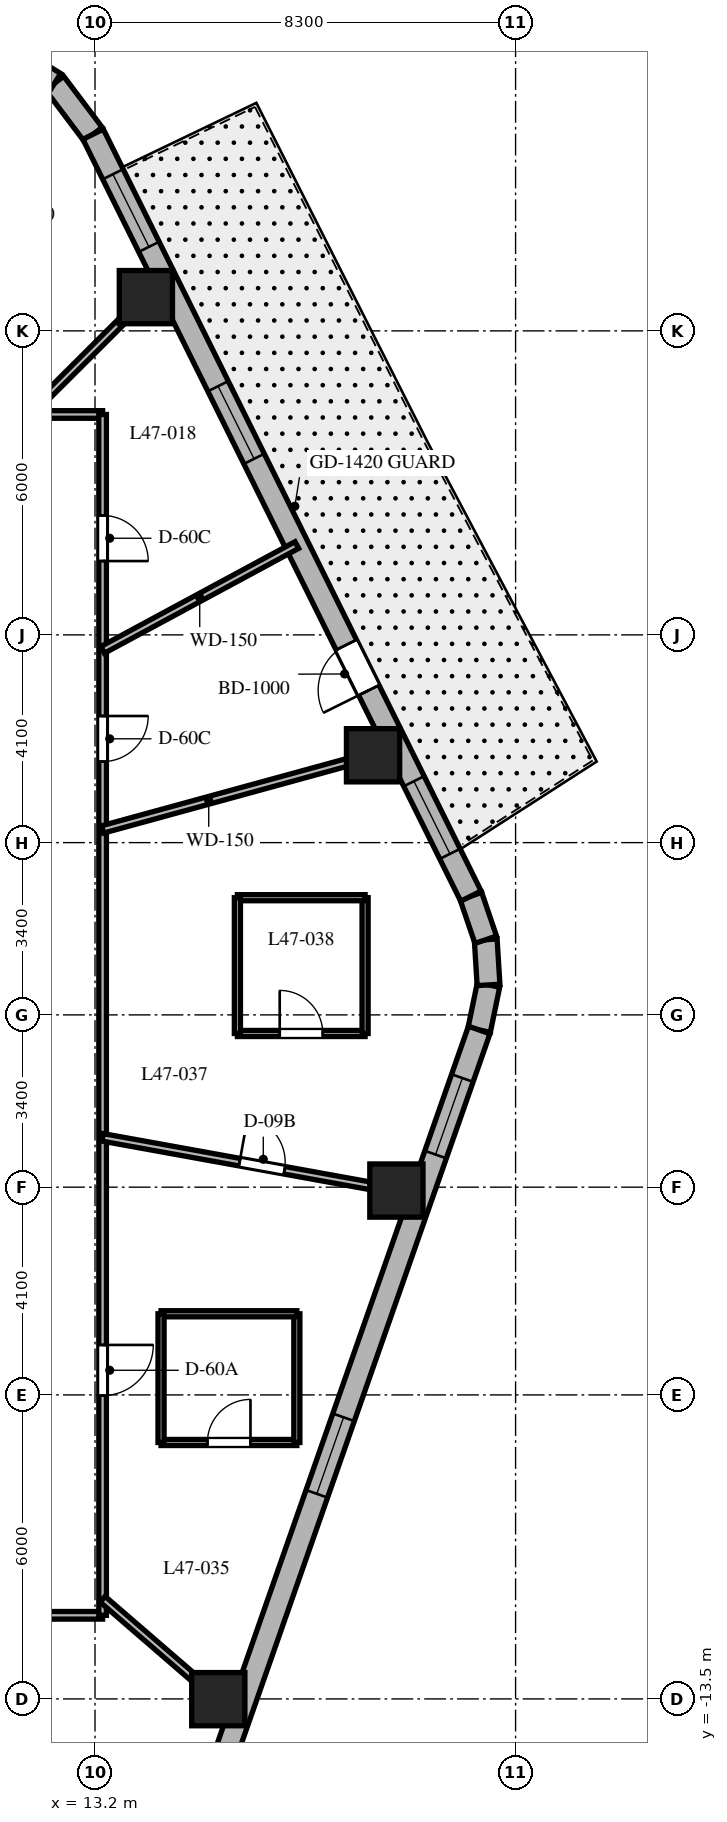
"""IFC4 building model, lengths in metres.
Left out: names, types, materials, properties, quantities, classifications, styles, units other than length and angle.
Written with IfcOpenShell. Run it as: python <this file> out.ifc"""

import sys

from ifc_helpers import new_model, si_unit, direction, frame, frame_2d, origin, origin_2d, place, context, subcontext, project, spatial, rectangle, extrude, element, fill, save


model = new_model("IFC4")
c1 = context("Model", 3, precision=1e-05, world=origin(), true_north=direction((0.0, 1.0)))
c2 = subcontext(c1, "Body", "Model", "MODEL_VIEW")
j1 = project(units=[si_unit("LENGTHUNIT", "METRE"), si_unit("PLANEANGLEUNIT", "RADIAN")], contexts=[c1])
p1 = place(None, origin())
s1 = spatial("IfcSite", under=j1, at=p1, CompositionType="ELEMENT")
p2 = place(p1, origin())
s2 = spatial("IfcBuilding", under=s1, at=p2, CompositionType="ELEMENT")
p3 = place(p2, frame((0.0, 0.0, 190.4)))
s3 = spatial("IfcBuildingStorey", under=s2, at=p3, CompositionType="ELEMENT", Elevation=190.4)
for number, where, z_axis, x_axis in (
    (1, (15.633, -13.505, 0.0), (0.0, 0.0, 1.0), (1.0, 0.0, 0.0)),
    (2, (19.148, -3.467, 0.0), (0.0, 0.0, 1.0), (1.0, 0.0, 0.0)),
    (3, (18.687, 5.124, 0.0), (0.0, 0.0, 1.0), (1.0, 0.0, 0.0)),
    (4, (14.204, 14.166, 0.0), (0.0, 0.0, 1.0), (1.0, 0.0, 0.0)),
):
    element("IfcColumn", number, at=place(p3, frame(where, z_axis=z_axis, x_axis=x_axis)), inside=s3, PredefinedType="COLUMN", context=c2, shape_type="SweptSolid", body=[
        extrude(rectangle(XDim=1.05, YDim=1.05, at=origin_2d()), origin(), (0.0, 0.0, 1.0), 3.7),
    ])
p4 = place(p3, frame((20.782, -0.298, 0.0), z_axis=(0.0, 0.0, 1.0), x_axis=(0.202570068411, 0.979267771033, 0.0)))
e5 = element("IfcWall", 5, at=p4, inside=s3, PredefinedType="SOLIDWALL", context=c2, shape_type="SweptSolid", body=[
    extrude(rectangle(XDim=0.909, YDim=0.45, at=frame_2d((0.454, 0.0))), origin(), (0.0, 0.0, 1.0), 3.4),
])
p5 = place(p3, frame((20.966, 0.592, 0.0), z_axis=(0.0, 0.0, 1.0), x_axis=(-0.061748898935, 0.998091715966, 0.0)))
e6 = element("IfcWall", 6, at=p5, inside=s3, PredefinedType="SOLIDWALL", context=c2, shape_type="SweptSolid", body=[
    extrude(rectangle(XDim=0.894, YDim=0.45, at=frame_2d((0.447, 0.0))), origin(), (0.0, 0.0, 1.0), 3.4),
])
p6 = place(p3, frame((20.911, 1.484, 0.0), z_axis=(0.0, 0.0, 1.0), x_axis=(-0.321623334353, 0.946867694453, 0.0)))
e7 = element("IfcWall", 7, at=p6, inside=s3, PredefinedType="SOLIDWALL", context=c2, shape_type="SweptSolid", body=[
    extrude(rectangle(XDim=0.909, YDim=0.45, at=frame_2d((0.454, 0.0))), origin(), (0.0, 0.0, 1.0), 3.4),
])
p7 = place(p3, frame((13.162, 17.381, 0.0), z_axis=(0.0, 0.0, 1.0), x_axis=(-0.601515770517, 0.798860925205, 0.0)))
e8 = element("IfcWall", 8, at=p7, inside=s3, PredefinedType="SOLIDWALL", context=c2, shape_type="SweptSolid", body=[
    extrude(rectangle(XDim=1.262, YDim=0.45, at=frame_2d((0.631, 0.0))), origin(), (0.0, 0.0, 1.0), 3.4),
])
p8 = place(p3, frame((12.403, 18.389, 0.0), z_axis=(0.0, 0.0, 1.0), x_axis=(-0.849795170926, 0.527113049991, 0.0)))
e9 = element("IfcWall", 9, at=p8, inside=s3, PredefinedType="SOLIDWALL", context=c2, shape_type="SweptSolid", body=[
    extrude(rectangle(XDim=1.241, YDim=0.45, at=frame_2d((0.62, 0.0))), origin(), (0.0, 0.0, 1.0), 3.4),
])
p9 = place(p3, frame((14.937, -16.993, 0.0), z_axis=(0.0, 0.0, 1.0), x_axis=(0.330431575061, 0.943829949834, 0.0)))
e10 = element("IfcWall", 10, at=p9, inside=s3, PredefinedType="SOLIDWALL", context=c2, shape_type="SweptSolid", body=[
    extrude(rectangle(XDim=17.689, YDim=0.45, at=frame_2d((8.844, 0.0))), origin(), (0.0, 0.0, 1.0), 3.4),
])
p10 = place(p9, frame((0.95, 0.0, 0.8)))
e11 = element("IfcOpeningElement", 11, at=p10, cuts=e10, PredefinedType="OPENING", context=c2, shape_type="SweptSolid", body=[
    extrude(rectangle(XDim=1.6, YDim=1.75, at=frame_2d((0.8, 0.875))), frame((0.0, 0.235, 0.0), z_axis=(0.0, -1.0, 0.0), x_axis=(1.0, 0.0, 0.0)), (0.0, 0.0, 1.0), 0.47),
])
p11 = place(p9, frame((7.99, 0.0, 0.8)))
e12 = element("IfcOpeningElement", 12, at=p11, cuts=e10, PredefinedType="OPENING", context=c2, shape_type="SweptSolid", body=[
    extrude(rectangle(XDim=1.6, YDim=1.75, at=frame_2d((0.8, 0.875))), frame((0.0, 0.235, 0.0), z_axis=(0.0, -1.0, 0.0), x_axis=(1.0, 0.0, 0.0)), (0.0, 0.0, 1.0), 0.47),
])
p12 = place(p9, frame((15.084, 0.0, 0.8)))
e13 = element("IfcOpeningElement", 13, at=p12, cuts=e10, PredefinedType="OPENING", context=c2, shape_type="SweptSolid", body=[
    extrude(rectangle(XDim=1.6, YDim=1.75, at=frame_2d((0.8, 0.875))), frame((0.0, 0.235, 0.0), z_axis=(0.0, -1.0, 0.0), x_axis=(1.0, 0.0, 0.0)), (0.0, 0.0, 1.0), 0.47),
])
p13 = place(p3, frame((20.618, 2.344, 0.0), z_axis=(0.0, 0.0, 1.0), x_axis=(-0.444243691097, 0.895905990002, 0.0)))
e14 = element("IfcWall", 14, at=p13, inside=s3, PredefinedType="SOLIDWALL", context=c2, shape_type="SweptSolid", body=[
    extrude(rectangle(XDim=16.784, YDim=0.45, at=frame_2d((8.392, 0.0))), origin(), (0.0, 0.0, 1.0), 3.4),
])
p14 = place(p13, frame((4.535, 0.0, 0.0)))
e15 = element("IfcOpeningElement", 15, at=p14, cuts=e14, PredefinedType="OPENING", context=c2, shape_type="SweptSolid", body=[
    extrude(rectangle(XDim=1.0, YDim=2.15, at=frame_2d((0.5, 1.075))), frame((0.0, 0.235, 0.0), z_axis=(0.0, -1.0, 0.0), x_axis=(1.0, 0.0, 0.0)), (0.0, 0.0, 1.0), 0.47),
])
p15 = place(p13, frame((9.633, 0.0, 0.8)))
e16 = element("IfcOpeningElement", 16, at=p15, cuts=e14, PredefinedType="OPENING", context=c2, shape_type="SweptSolid", body=[
    extrude(rectangle(XDim=1.6, YDim=1.75, at=frame_2d((0.8, 0.875))), frame((0.0, 0.235, 0.0), z_axis=(0.0, -1.0, 0.0), x_axis=(1.0, 0.0, 0.0)), (0.0, 0.0, 1.0), 0.47),
])
p16 = place(p13, frame((14.303, 0.0, 0.8)))
e17 = element("IfcOpeningElement", 17, at=p16, cuts=e14, PredefinedType="OPENING", context=c2, shape_type="SweptSolid", body=[
    extrude(rectangle(XDim=1.6, YDim=1.75, at=frame_2d((0.8, 0.875))), frame((0.0, 0.235, 0.0), z_axis=(0.0, -1.0, 0.0), x_axis=(1.0, 0.0, 0.0)), (0.0, 0.0, 1.0), 0.47),
])
p17 = place(p13, frame((0.931, 0.0, 0.8)))
e18 = element("IfcOpeningElement", 18, at=p17, cuts=e14, PredefinedType="OPENING", context=c2, shape_type="SweptSolid", body=[
    extrude(rectangle(XDim=1.6, YDim=1.75, at=frame_2d((0.8, 0.875))), frame((0.0, 0.235, 0.0), z_axis=(0.0, -1.0, 0.0), x_axis=(1.0, 0.0, 0.0)), (0.0, 0.0, 1.0), 0.47),
])
p18 = place(p3, frame((13.35, -11.85, 0.0), z_axis=(0.0, 0.0, 1.0), x_axis=(-1.0, 0.0, 0.0)))
e19 = element("IfcWall", 19, at=p18, inside=s3, PredefinedType="PARTITIONING", context=c2, shape_type="SweptSolid", body=[
    extrude(rectangle(XDim=26.7, YDim=0.15, at=frame_2d((13.35, 0.0))), origin(), (0.0, 0.0, 1.0), 2.84),
])
p19 = place(p18, frame((22.459, 0.0, 0.0)))
e20 = element("IfcOpeningElement", 20, at=p19, cuts=e19, PredefinedType="OPENING", context=c2, shape_type="SweptSolid", body=[
    extrude(rectangle(XDim=0.9, YDim=2.03, at=frame_2d((0.45, 1.015))), frame((0.0, 0.085, 0.0), z_axis=(0.0, -1.0, 0.0), x_axis=(1.0, 0.0, 0.0)), (0.0, 0.0, 1.0), 0.17),
])
p20 = place(p18, frame((18.304, 0.0, 0.0)))
e21 = element("IfcOpeningElement", 21, at=p20, cuts=e19, PredefinedType="OPENING", context=c2, shape_type="SweptSolid", body=[
    extrude(rectangle(XDim=0.9, YDim=2.03, at=frame_2d((0.45, 1.015))), frame((0.0, 0.085, 0.0), z_axis=(0.0, -1.0, 0.0), x_axis=(1.0, 0.0, 0.0)), (0.0, 0.0, 1.0), 0.17),
])
p21 = place(p18, frame((12.362, 0.0, 0.0)))
e22 = element("IfcOpeningElement", 22, at=p21, cuts=e19, PredefinedType="OPENING", context=c2, shape_type="SweptSolid", body=[
    extrude(rectangle(XDim=0.95, YDim=2.03, at=frame_2d((0.475, 1.015))), frame((0.0, 0.085, 0.0), z_axis=(0.0, -1.0, 0.0), x_axis=(1.0, 0.0, 0.0)), (0.0, 0.0, 1.0), 0.17),
])
p22 = place(p18, frame((3.995, 0.0, 0.0)))
e23 = element("IfcOpeningElement", 23, at=p22, cuts=e19, PredefinedType="OPENING", context=c2, shape_type="SweptSolid", body=[
    extrude(rectangle(XDim=0.95, YDim=2.03, at=frame_2d((0.475, 1.015))), frame((0.0, 0.085, 0.0), z_axis=(0.0, -1.0, 0.0), x_axis=(1.0, 0.0, 0.0)), (0.0, 0.0, 1.0), 0.17),
])
p23 = place(p3, frame((-13.35, 11.85, 0.0), z_axis=(0.0, 0.0, 1.0), x_axis=(1.0, 0.0, 0.0)))
e24 = element("IfcWall", 24, at=p23, inside=s3, PredefinedType="PARTITIONING", context=c2, shape_type="SweptSolid", body=[
    extrude(rectangle(XDim=26.7, YDim=0.15, at=frame_2d((13.35, 0.0))), origin(), (0.0, 0.0, 1.0), 2.84),
])
p24 = place(p23, frame((20.682, 0.0, 0.0)))
e25 = element("IfcOpeningElement", 25, at=p24, cuts=e24, PredefinedType="OPENING", context=c2, shape_type="SweptSolid", body=[
    extrude(rectangle(XDim=0.95, YDim=2.03, at=frame_2d((0.475, 1.015))), frame((0.0, 0.085, 0.0), z_axis=(0.0, -1.0, 0.0), x_axis=(1.0, 0.0, 0.0)), (0.0, 0.0, 1.0), 0.17),
])
p25 = place(p23, frame((12.362, 0.0, 0.0)))
e26 = element("IfcOpeningElement", 26, at=p25, cuts=e24, PredefinedType="OPENING", context=c2, shape_type="SweptSolid", body=[
    extrude(rectangle(XDim=0.95, YDim=2.03, at=frame_2d((0.475, 1.015))), frame((0.0, 0.085, 0.0), z_axis=(0.0, -1.0, 0.0), x_axis=(1.0, 0.0, 0.0)), (0.0, 0.0, 1.0), 0.17),
])
p26 = place(p23, frame((3.995, 0.0, 0.0)))
e27 = element("IfcOpeningElement", 27, at=p26, cuts=e24, PredefinedType="OPENING", context=c2, shape_type="SweptSolid", body=[
    extrude(rectangle(XDim=0.95, YDim=2.03, at=frame_2d((0.475, 1.015))), frame((0.0, 0.085, 0.0), z_axis=(0.0, -1.0, 0.0), x_axis=(1.0, 0.0, 0.0)), (0.0, 0.0, 1.0), 0.17),
])
p27 = place(p3, frame((13.35, 11.85, 0.0), z_axis=(0.0, 0.0, 1.0), x_axis=(0.0, -1.0, 0.0)))
e28 = element("IfcWall", 28, at=p27, inside=s3, PredefinedType="PARTITIONING", context=c2, shape_type="SweptSolid", body=[
    extrude(rectangle(XDim=23.7, YDim=0.15, at=frame_2d((11.85, 0.0))), origin(), (0.0, 0.0, 1.0), 2.84),
])
p28 = place(p27, frame((5.951, 0.0, 0.0)))
e29 = element("IfcOpeningElement", 29, at=p28, cuts=e28, PredefinedType="OPENING", context=c2, shape_type="SweptSolid", body=[
    extrude(rectangle(XDim=0.9, YDim=2.03, at=frame_2d((0.45, 1.015))), frame((0.0, 0.085, 0.0), z_axis=(0.0, -1.0, 0.0), x_axis=(1.0, 0.0, 0.0)), (0.0, 0.0, 1.0), 0.17),
])
p29 = place(p27, frame((1.993, 0.0, 0.0)))
e30 = element("IfcOpeningElement", 30, at=p29, cuts=e28, PredefinedType="OPENING", context=c2, shape_type="SweptSolid", body=[
    extrude(rectangle(XDim=0.9, YDim=2.03, at=frame_2d((0.45, 1.015))), frame((0.0, 0.085, 0.0), z_axis=(0.0, -1.0, 0.0), x_axis=(1.0, 0.0, 0.0)), (0.0, 0.0, 1.0), 0.17),
])
p30 = place(p27, frame((18.364, 0.0, 0.0)))
e31 = element("IfcOpeningElement", 31, at=p30, cuts=e28, PredefinedType="OPENING", context=c2, shape_type="SweptSolid", body=[
    extrude(rectangle(XDim=1.0, YDim=2.03, at=frame_2d((0.5, 1.015))), frame((0.0, 0.085, 0.0), z_axis=(0.0, -1.0, 0.0), x_axis=(1.0, 0.0, 0.0)), (0.0, 0.0, 1.0), 0.17),
])
p31 = place(p3, frame((13.35, 3.661, 0.0), z_axis=(0.0, 0.0, 1.0), x_axis=(0.964397145454, 0.264458211898, 0.0)))
e32 = element("IfcWall", 32, at=p31, inside=s3, PredefinedType="PARTITIONING", context=c2, shape_type="SweptSolid", body=[
    extrude(rectangle(XDim=6.039, YDim=0.15, at=frame_2d((3.019, 0.0))), origin(), (0.0, 0.0, 1.0), 2.64),
])
p32 = place(p3, frame((13.35, 7.204, 0.0), z_axis=(0.0, 0.0, 1.0), x_axis=(0.880033329067, 0.474911928394, 0.0)))
e33 = element("IfcWall", 33, at=p32, inside=s3, PredefinedType="PARTITIONING", context=c2, shape_type="SweptSolid", body=[
    extrude(rectangle(XDim=4.355, YDim=0.15, at=frame_2d((2.178, 0.0))), origin(), (0.0, 0.0, 1.0), 2.64),
])
p33 = place(p3, frame((11.882, 11.85, 0.0), z_axis=(0.0, 0.0, 1.0), x_axis=(0.708037373639, 0.706174962407, 0.0)))
e34 = element("IfcWall", 34, at=p33, inside=s3, PredefinedType="PARTITIONING", context=c2, shape_type="SweptSolid", body=[
    extrude(rectangle(XDim=3.802, YDim=0.15, at=frame_2d((1.901, 0.0))), origin(), (0.0, 0.0, 1.0), 2.64),
])
p34 = place(p3, frame((13.35, -11.533, 0.0), z_axis=(0.0, 0.0, 1.0), x_axis=(0.756711647314, -0.65374879183, 0.0)))
e35 = element("IfcWall", 35, at=p34, inside=s3, PredefinedType="PARTITIONING", context=c2, shape_type="SweptSolid", body=[
    extrude(rectangle(XDim=3.55, YDim=0.15, at=frame_2d((1.775, 0.0))), origin(), (0.0, 0.0, 1.0), 2.64),
])
p35 = place(p3, frame((13.35, -2.417, 0.0), z_axis=(0.0, 0.0, 1.0), x_axis=(0.98399796473, -0.178179699761, 0.0)))
e36 = element("IfcWall", 36, at=p35, inside=s3, PredefinedType="PARTITIONING", context=c2, shape_type="SweptSolid", body=[
    extrude(rectangle(XDim=6.393, YDim=0.15, at=frame_2d((3.197, 0.0))), origin(), (0.0, 0.0, 1.0), 2.64),
])
p36 = place(p35, frame((2.747, 0.0, 0.0)))
e37 = element("IfcOpeningElement", 37, at=p36, cuts=e36, PredefinedType="OPENING", context=c2, shape_type="SweptSolid", body=[
    extrude(rectangle(XDim=0.9, YDim=2.03, at=frame_2d((0.45, 1.015))), frame((0.0, 0.085, 0.0), z_axis=(0.0, -1.0, 0.0), x_axis=(1.0, 0.0, 0.0)), (0.0, 0.0, 1.0), 0.17),
])
p37 = place(p3, frame((14.503, -8.439, 0.0), z_axis=(0.0, 0.0, 1.0), x_axis=(1.0, 0.0, 0.0)))
e38 = element("IfcWall", 38, at=p37, inside=s3, PredefinedType="PARTITIONING", context=c2, shape_type="SweptSolid", body=[
    extrude(rectangle(XDim=2.68, YDim=0.12, at=frame_2d((1.34, 0.0))), origin(), (0.0, 0.0, 1.0), 2.972),
])
p38 = place(p37, frame((0.915, 0.0, 0.0)))
e39 = element("IfcOpeningElement", 39, at=p38, cuts=e38, PredefinedType="OPENING", context=c2, shape_type="SweptSolid", body=[
    extrude(rectangle(XDim=0.85, YDim=2.03, at=frame_2d((0.425, 1.015))), frame((0.0, 0.07, 0.0), z_axis=(0.0, -1.0, 0.0), x_axis=(1.0, 0.0, 0.0)), (0.0, 0.0, 1.0), 0.14),
])
p39 = place(p3, frame((17.183, -8.439, 0.0), z_axis=(0.0, 0.0, 1.0), x_axis=(0.0, 1.0, 0.0)))
e40 = element("IfcWall", 40, at=p39, inside=s3, PredefinedType="PARTITIONING", context=c2, shape_type="SweptSolid", body=[
    extrude(rectangle(XDim=2.54, YDim=0.12, at=frame_2d((1.27, 0.0))), origin(), (0.0, 0.0, 1.0), 2.64),
])
p40 = place(p3, frame((17.183, -5.899, 0.0), z_axis=(0.0, 0.0, 1.0), x_axis=(-1.0, 0.0, 0.0)))
e41 = element("IfcWall", 41, at=p40, inside=s3, PredefinedType="PARTITIONING", context=c2, shape_type="SweptSolid", body=[
    extrude(rectangle(XDim=2.68, YDim=0.12, at=frame_2d((1.34, 0.0))), origin(), (0.0, 0.0, 1.0), 2.972),
])
p41 = place(p3, frame((14.503, -5.899, 0.0), z_axis=(0.0, 0.0, 1.0), x_axis=(0.0, -1.0, 0.0)))
e42 = element("IfcWall", 42, at=p41, inside=s3, PredefinedType="PARTITIONING", context=c2, shape_type="SweptSolid", body=[
    extrude(rectangle(XDim=2.54, YDim=0.12, at=frame_2d((1.27, 0.0))), origin(), (0.0, 0.0, 1.0), 3.4),
])
p42 = place(p3, frame((16.01, -0.367, 0.0), z_axis=(0.0, 0.0, 1.0), x_axis=(1.0, 0.0, 0.0)))
e43 = element("IfcWall", 43, at=p42, inside=s3, PredefinedType="PARTITIONING", context=c2, shape_type="SweptSolid", body=[
    extrude(rectangle(XDim=2.52, YDim=0.12, at=frame_2d((1.26, 0.0))), origin(), (0.0, 0.0, 1.0), 3.4),
])
p43 = place(p42, frame((0.835, 0.0, 0.0)))
e44 = element("IfcOpeningElement", 44, at=p43, cuts=e43, PredefinedType="OPENING", context=c2, shape_type="SweptSolid", body=[
    extrude(rectangle(XDim=0.85, YDim=2.03, at=frame_2d((0.425, 1.015))), frame((0.0, 0.07, 0.0), z_axis=(0.0, -1.0, 0.0), x_axis=(1.0, 0.0, 0.0)), (0.0, 0.0, 1.0), 0.14),
])
p44 = place(p3, frame((18.53, -0.367, 0.0), z_axis=(0.0, 0.0, 1.0), x_axis=(0.0, 1.0, 0.0)))
e45 = element("IfcWall", 45, at=p44, inside=s3, PredefinedType="PARTITIONING", context=c2, shape_type="SweptSolid", body=[
    extrude(rectangle(XDim=2.68, YDim=0.12, at=frame_2d((1.34, 0.0))), origin(), (0.0, 0.0, 1.0), 2.64),
])
p45 = place(p3, frame((18.53, 2.313, 0.0), z_axis=(0.0, 0.0, 1.0), x_axis=(-1.0, 0.0, 0.0)))
e46 = element("IfcWall", 46, at=p45, inside=s3, PredefinedType="PARTITIONING", context=c2, shape_type="SweptSolid", body=[
    extrude(rectangle(XDim=2.52, YDim=0.12, at=frame_2d((1.26, 0.0))), origin(), (0.0, 0.0, 1.0), 3.4),
])
p46 = place(p3, frame((16.01, 2.313, 0.0), z_axis=(0.0, 0.0, 1.0), x_axis=(0.0, -1.0, 0.0)))
e47 = element("IfcWall", 47, at=p46, inside=s3, PredefinedType="PARTITIONING", context=c2, shape_type="SweptSolid", body=[
    extrude(rectangle(XDim=2.68, YDim=0.12, at=frame_2d((1.34, 0.0))), origin(), (0.0, 0.0, 1.0), 3.4),
])
p47 = place(p11, origin())
e48 = element("IfcWindow", 48, at=p47, inside=s3, PartitioningType="SINGLE_PANEL", PredefinedType="WINDOW", context=c2, shape_type="SweptSolid", body=[
    extrude(rectangle(XDim=1.6, YDim=1.75, at=frame_2d((0.8, 0.875))), frame((0.0, 0.03, 0.0), z_axis=(0.0, -1.0, 0.0), x_axis=(1.0, 0.0, 0.0)), (0.0, 0.0, 1.0), 0.06),
])
fill(e12, e48)
p48 = place(p12, origin())
e49 = element("IfcWindow", 49, at=p48, inside=s3, PartitioningType="SINGLE_PANEL", PredefinedType="WINDOW", context=c2, shape_type="SweptSolid", body=[
    extrude(rectangle(XDim=1.6, YDim=1.75, at=frame_2d((0.8, 0.875))), frame((0.0, 0.03, 0.0), z_axis=(0.0, -1.0, 0.0), x_axis=(1.0, 0.0, 0.0)), (0.0, 0.0, 1.0), 0.06),
])
fill(e13, e49)
p49 = place(p14, origin())
e50 = element("IfcDoor", 50, at=p49, inside=s3, OperationType="SINGLE_SWING_LEFT", PredefinedType="DOOR", context=c2, shape_type="SweptSolid", body=[
    extrude(rectangle(XDim=1.0, YDim=2.15, at=frame_2d((0.5, 1.075))), frame((0.0, 0.025, 0.0), z_axis=(0.0, -1.0, 0.0), x_axis=(1.0, 0.0, 0.0)), (0.0, 0.0, 1.0), 0.05),
])
fill(e15, e50)
p50 = place(p15, origin())
e51 = element("IfcWindow", 51, at=p50, inside=s3, PartitioningType="SINGLE_PANEL", PredefinedType="WINDOW", context=c2, shape_type="SweptSolid", body=[
    extrude(rectangle(XDim=1.6, YDim=1.75, at=frame_2d((0.8, 0.875))), frame((0.0, 0.03, 0.0), z_axis=(0.0, -1.0, 0.0), x_axis=(1.0, 0.0, 0.0)), (0.0, 0.0, 1.0), 0.06),
])
fill(e16, e51)
p51 = place(p16, origin())
e52 = element("IfcWindow", 52, at=p51, inside=s3, PartitioningType="SINGLE_PANEL", PredefinedType="WINDOW", context=c2, shape_type="SweptSolid", body=[
    extrude(rectangle(XDim=1.6, YDim=1.75, at=frame_2d((0.8, 0.875))), frame((0.0, 0.03, 0.0), z_axis=(0.0, -1.0, 0.0), x_axis=(1.0, 0.0, 0.0)), (0.0, 0.0, 1.0), 0.06),
])
fill(e17, e52)
p52 = place(p17, origin())
e53 = element("IfcWindow", 53, at=p52, inside=s3, PartitioningType="SINGLE_PANEL", PredefinedType="WINDOW", context=c2, shape_type="SweptSolid", body=[
    extrude(rectangle(XDim=1.6, YDim=1.75, at=frame_2d((0.8, 0.875))), frame((0.0, 0.03, 0.0), z_axis=(0.0, -1.0, 0.0), x_axis=(1.0, 0.0, 0.0)), (0.0, 0.0, 1.0), 0.06),
])
fill(e18, e53)
p53 = place(p28, origin())
e54 = element("IfcDoor", 54, at=p53, inside=s3, OperationType="SINGLE_SWING_LEFT", PredefinedType="DOOR", context=c2, shape_type="SweptSolid", body=[
    extrude(rectangle(XDim=0.9, YDim=2.03, at=frame_2d((0.45, 1.015))), frame((0.0, 0.025, 0.0), z_axis=(0.0, -1.0, 0.0), x_axis=(1.0, 0.0, 0.0)), (0.0, 0.0, 1.0), 0.05),
])
fill(e29, e54)
p54 = place(p29, origin())
e55 = element("IfcDoor", 55, at=p54, inside=s3, OperationType="SINGLE_SWING_RIGHT", PredefinedType="DOOR", context=c2, shape_type="SweptSolid", body=[
    extrude(rectangle(XDim=0.9, YDim=2.03, at=frame_2d((0.45, 1.015))), frame((0.0, 0.025, 0.0), z_axis=(0.0, -1.0, 0.0), x_axis=(1.0, 0.0, 0.0)), (0.0, 0.0, 1.0), 0.05),
])
fill(e30, e55)
p55 = place(p30, origin())
e56 = element("IfcDoor", 56, at=p55, inside=s3, OperationType="SINGLE_SWING_LEFT", PredefinedType="DOOR", context=c2, shape_type="SweptSolid", body=[
    extrude(rectangle(XDim=1.0, YDim=2.03, at=frame_2d((0.5, 1.015))), frame((0.0, 0.025, 0.0), z_axis=(0.0, -1.0, 0.0), x_axis=(1.0, 0.0, 0.0)), (0.0, 0.0, 1.0), 0.05),
])
fill(e31, e56)
p56 = place(p36, origin())
e57 = element("IfcDoor", 57, at=p56, inside=s3, OperationType="SINGLE_SWING_LEFT", PredefinedType="DOOR", context=c2, shape_type="SweptSolid", body=[
    extrude(rectangle(XDim=0.9, YDim=2.03, at=frame_2d((0.45, 1.015))), frame((0.0, 0.025, 0.0), z_axis=(0.0, -1.0, 0.0), x_axis=(1.0, 0.0, 0.0)), (0.0, 0.0, 1.0), 0.05),
])
fill(e37, e57)
p57 = place(p38, origin())
e58 = element("IfcDoor", 58, at=p57, inside=s3, OperationType="SINGLE_SWING_RIGHT", PredefinedType="DOOR", context=c2, shape_type="SweptSolid", body=[
    extrude(rectangle(XDim=0.85, YDim=2.03, at=frame_2d((0.425, 1.015))), frame((0.0, 0.025, 0.0), z_axis=(0.0, -1.0, 0.0), x_axis=(1.0, 0.0, 0.0)), (0.0, 0.0, 1.0), 0.05),
])
fill(e39, e58)
p58 = place(p43, origin())
e59 = element("IfcDoor", 59, at=p58, inside=s3, OperationType="SINGLE_SWING_LEFT", PredefinedType="DOOR", context=c2, shape_type="SweptSolid", body=[
    extrude(rectangle(XDim=0.85, YDim=2.03, at=frame_2d((0.425, 1.015))), frame((0.0, 0.025, 0.0), z_axis=(0.0, -1.0, 0.0), x_axis=(1.0, 0.0, 0.0)), (0.0, 0.0, 1.0), 0.05),
])
fill(e44, e59)
save(model, sys.argv[1])
